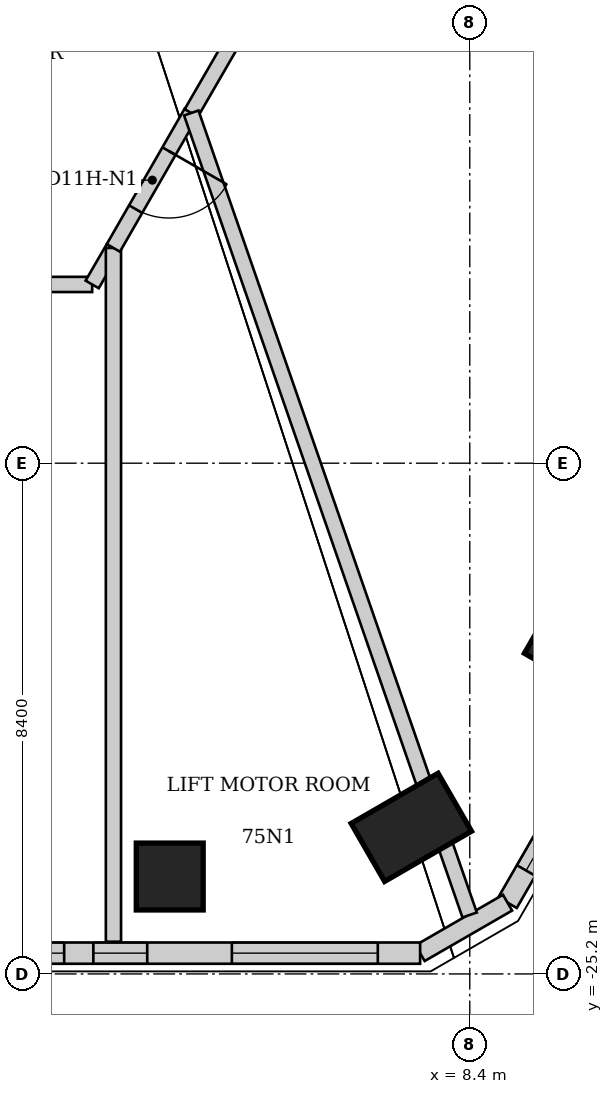
"""IFC4 building model, lengths in metres.
Left out: names, types, materials, properties, quantities, classifications, styles, units other than length and angle.
Written with IfcOpenShell. Run it as: python <this file> out.ifc"""

import sys

from ifc_helpers import new_model, si_unit, direction, frame, frame_2d, origin, origin_2d, place, context, subcontext, project, spatial, polyline, rectangle, outline, extrude, element, fill, save


model = new_model("IFC4")
c1 = context("Model", 3, precision=1e-05, world=origin(), true_north=direction((0.0, 1.0)))
c2 = subcontext(c1, "Body", "Model", "MODEL_VIEW")
j1 = project(units=[si_unit("LENGTHUNIT", "METRE"), si_unit("PLANEANGLEUNIT", "RADIAN")], contexts=[c1])
p1 = place(None, origin())
s1 = spatial("IfcSite", under=j1, at=p1, CompositionType="ELEMENT")
p2 = place(p1, origin())
s2 = spatial("IfcBuilding", under=s1, at=p2, CompositionType="ELEMENT")
p3 = place(p2, frame((0.0, 0.0, 298.8)))
s3 = spatial("IfcBuildingStorey", under=s2, at=p3, CompositionType="ELEMENT", Elevation=298.8)
p4 = place(p3, frame((10.05, -19.725, 0.0), z_axis=(0.0, 0.0, 1.0), x_axis=(0.866025403784, -0.5, 0.0)))
e1 = element("IfcColumn", 1, at=p4, inside=s3, PredefinedType="COLUMN", context=c2, shape_type="SweptSolid", body=[
    extrude(rectangle(XDim=1.1, YDim=1.1, at=origin_2d()), origin(), (0.0, 0.0, 1.0), 7.156),
])
p5 = place(p3, frame((7.439, -22.79, 0.0), z_axis=(0.0, 0.0, 1.0), x_axis=(0.5, -0.866025403784, 0.0)))
e2 = element("IfcColumn", 2, at=p5, inside=s3, PredefinedType="COLUMN", context=c2, shape_type="SweptSolid", body=[
    extrude(rectangle(XDim=1.1, YDim=1.65, at=origin_2d()), origin(), (0.0, 0.0, 1.0), 6.335),
])
p6 = place(p3, frame((3.466, -23.598, 0.0), z_axis=(0.0, 0.0, 1.0), x_axis=(0.0, -1.0, 0.0)))
e3 = element("IfcColumn", 3, at=p6, inside=s3, PredefinedType="COLUMN", context=c2, shape_type="SweptSolid", body=[
    extrude(rectangle(XDim=1.1, YDim=1.1, at=origin_2d()), origin(), (0.0, 0.0, 1.0), 6.118),
])
p7 = place(p3, frame((25.319, 4.202, 0.0), z_axis=(0.0, 0.0, 1.0), x_axis=(-0.499997560549, -0.866026812198, 0.0)))
e4 = element("IfcWall", 4, at=p7, inside=s3, PredefinedType="SOLIDWALL", context=c2, shape_type="SweptSolid", body=[
    extrude(outline(polyline([(0.0, 0.0), (32.597, 0.0), (32.597, 6.021), (0.0, 13.584), (0.0, 0.0)])), frame((0.0, 0.175, 0.0), z_axis=(0.0, -1.0, 0.0), x_axis=(1.0, 0.0, 0.0)), (0.0, 0.0, 1.0), 0.35),
])
p8 = place(p7, frame((0.611, 0.0, 0.6)))
e5 = element("IfcOpeningElement", 5, at=p8, cuts=e4, PredefinedType="OPENING", context=c2, shape_type="SweptSolid", body=[
    extrude(rectangle(XDim=2.4, YDim=3.6, at=frame_2d((1.2, 1.8))), frame((0.0, 0.185, 0.0), z_axis=(0.0, -1.0, 0.0), x_axis=(1.0, 0.0, 0.0)), (0.0, 0.0, 1.0), 0.37),
])
p9 = place(p7, frame((4.233, 0.0, 0.6)))
e6 = element("IfcOpeningElement", 6, at=p9, cuts=e4, PredefinedType="OPENING", context=c2, shape_type="SweptSolid", body=[
    extrude(rectangle(XDim=2.4, YDim=3.6, at=frame_2d((1.2, 1.8))), frame((0.0, 0.185, 0.0), z_axis=(0.0, -1.0, 0.0), x_axis=(1.0, 0.0, 0.0)), (0.0, 0.0, 1.0), 0.37),
])
p10 = place(p7, frame((7.855, 0.0, 3.005)))
e7 = element("IfcOpeningElement", 7, at=p10, cuts=e4, PredefinedType="OPENING", context=c2, shape_type="SweptSolid", body=[
    extrude(rectangle(XDim=0.456, YDim=1.195, at=frame_2d((0.228, 0.598))), frame((0.0, 0.185, 0.0), z_axis=(0.0, -1.0, 0.0), x_axis=(1.0, 0.0, 0.0)), (0.0, 0.0, 1.0), 0.37),
])
p11 = place(p7, frame((9.23, 0.0, 0.601)))
e8 = element("IfcOpeningElement", 8, at=p11, cuts=e4, PredefinedType="OPENING", context=c2, shape_type="SweptSolid", body=[
    extrude(rectangle(XDim=1.024, YDim=3.249, at=frame_2d((0.512, 1.625))), frame((0.0, 0.185, 0.0), z_axis=(0.0, -1.0, 0.0), x_axis=(1.0, 0.0, 0.0)), (0.0, 0.0, 1.0), 0.37),
])
p12 = place(p7, frame((11.477, 0.0, 0.601)))
e9 = element("IfcOpeningElement", 9, at=p12, cuts=e4, PredefinedType="OPENING", context=c2, shape_type="SweptSolid", body=[
    extrude(rectangle(XDim=1.444, YDim=3.599, at=frame_2d((0.722, 1.8))), frame((0.0, 0.185, 0.0), z_axis=(0.0, -1.0, 0.0), x_axis=(1.0, 0.0, 0.0)), (0.0, 0.0, 1.0), 0.37),
])
p13 = place(p7, frame((15.098, 0.0, 0.6)))
e10 = element("IfcOpeningElement", 10, at=p13, cuts=e4, PredefinedType="OPENING", context=c2, shape_type="SweptSolid", body=[
    extrude(rectangle(XDim=2.4, YDim=3.6, at=frame_2d((1.2, 1.8))), frame((0.0, 0.185, 0.0), z_axis=(0.0, -1.0, 0.0), x_axis=(1.0, 0.0, 0.0)), (0.0, 0.0, 1.0), 0.37),
])
p14 = place(p7, frame((19.858, 0.0, 0.601)))
e11 = element("IfcOpeningElement", 11, at=p14, cuts=e4, PredefinedType="OPENING", context=c2, shape_type="SweptSolid", body=[
    extrude(rectangle(XDim=1.262, YDim=3.099, at=frame_2d((0.631, 1.55))), frame((0.0, 0.185, 0.0), z_axis=(0.0, -1.0, 0.0), x_axis=(1.0, 0.0, 0.0)), (0.0, 0.0, 1.0), 0.37),
])
p15 = place(p7, frame((22.343, 0.0, 0.601)))
e12 = element("IfcOpeningElement", 12, at=p15, cuts=e4, PredefinedType="OPENING", context=c2, shape_type="SweptSolid", body=[
    extrude(rectangle(XDim=0.994, YDim=2.449, at=frame_2d((0.497, 1.225))), frame((0.0, 0.185, 0.0), z_axis=(0.0, -1.0, 0.0), x_axis=(1.0, 0.0, 0.0)), (0.0, 0.0, 1.0), 0.37),
])
p16 = place(p7, frame((24.142, 0.0, 2.72)))
e13 = element("IfcOpeningElement", 13, at=p16, cuts=e4, PredefinedType="OPENING", context=c2, shape_type="SweptSolid", body=[
    extrude(rectangle(XDim=0.6, YDim=1.48, at=frame_2d((0.3, 0.74))), frame((0.0, 0.185, 0.0), z_axis=(0.0, -1.0, 0.0), x_axis=(1.0, 0.0, 0.0)), (0.0, 0.0, 1.0), 0.37),
])
p17 = place(p7, frame((25.964, 0.0, 0.6)))
e14 = element("IfcOpeningElement", 14, at=p17, cuts=e4, PredefinedType="OPENING", context=c2, shape_type="SweptSolid", body=[
    extrude(rectangle(XDim=2.4, YDim=3.6, at=frame_2d((1.2, 1.8))), frame((0.0, 0.185, 0.0), z_axis=(0.0, -1.0, 0.0), x_axis=(1.0, 0.0, 0.0)), (0.0, 0.0, 1.0), 0.37),
])
p18 = place(p7, frame((29.586, 0.0, 0.6)))
e15 = element("IfcOpeningElement", 15, at=p18, cuts=e4, PredefinedType="OPENING", context=c2, shape_type="SweptSolid", body=[
    extrude(rectangle(XDim=2.4, YDim=3.6, at=frame_2d((1.2, 1.8))), frame((0.0, 0.185, 0.0), z_axis=(0.0, -1.0, 0.0), x_axis=(1.0, 0.0, 0.0)), (0.0, 0.0, 1.0), 0.37),
])
p19 = place(p7, frame((2.698, 0.0, 5.6)))
e16 = element("IfcOpeningElement", 16, at=p19, cuts=e4, PredefinedType="OPENING", context=c2, shape_type="SweptSolid", body=[
    extrude(rectangle(XDim=2.0, YDim=2.4, at=frame_2d((1.0, 1.2))), frame((0.0, 0.185, 0.0), z_axis=(0.0, -1.0, 0.0), x_axis=(1.0, 0.0, 0.0)), (0.0, 0.0, 1.0), 0.37),
])
p20 = place(p7, frame((6.298, 0.0, 5.6)))
e17 = element("IfcOpeningElement", 17, at=p20, cuts=e4, PredefinedType="OPENING", context=c2, shape_type="SweptSolid", body=[
    extrude(rectangle(XDim=2.0, YDim=2.4, at=frame_2d((1.0, 1.2))), frame((0.0, 0.185, 0.0), z_axis=(0.0, -1.0, 0.0), x_axis=(1.0, 0.0, 0.0)), (0.0, 0.0, 1.0), 0.37),
])
p21 = place(p7, frame((10.457, 0.0, 5.601)))
e18 = element("IfcOpeningElement", 18, at=p21, cuts=e4, PredefinedType="OPENING", context=c2, shape_type="SweptSolid", body=[
    extrude(rectangle(XDim=1.348, YDim=2.124, at=frame_2d((0.674, 1.062))), frame((0.0, 0.185, 0.0), z_axis=(0.0, -1.0, 0.0), x_axis=(1.0, 0.0, 0.0)), (0.0, 0.0, 1.0), 0.37),
])
p22 = place(p7, frame((13.498, 0.0, 5.6)))
e19 = element("IfcOpeningElement", 19, at=p22, cuts=e4, PredefinedType="OPENING", context=c2, shape_type="SweptSolid", body=[
    extrude(rectangle(XDim=2.0, YDim=2.4, at=frame_2d((1.0, 1.2))), frame((0.0, 0.185, 0.0), z_axis=(0.0, -1.0, 0.0), x_axis=(1.0, 0.0, 0.0)), (0.0, 0.0, 1.0), 0.37),
])
p23 = place(p7, frame((17.098, 0.0, 5.6)))
e20 = element("IfcOpeningElement", 20, at=p23, cuts=e4, PredefinedType="OPENING", context=c2, shape_type="SweptSolid", body=[
    extrude(rectangle(XDim=2.0, YDim=2.4, at=frame_2d((1.0, 1.2))), frame((0.0, 0.185, 0.0), z_axis=(0.0, -1.0, 0.0), x_axis=(1.0, 0.0, 0.0)), (0.0, 0.0, 1.0), 0.37),
])
p24 = place(p3, frame((9.021, -24.028, 0.0), z_axis=(0.0, 0.0, 1.0), x_axis=(-0.865989634427, -0.500061949227, 0.0)))
e21 = element("IfcWall", 21, at=p24, inside=s3, PredefinedType="SOLIDWALL", context=c2, shape_type="SweptSolid", body=[
    extrude(outline(polyline([(0.0, 0.0), (1.66, 0.0), (1.66, 5.787), (0.0, 6.009), (0.0, 0.0)])), frame((0.0, 0.15, 0.0), z_axis=(0.0, -1.0, 0.0), x_axis=(1.0, 0.0, 0.0)), (0.0, 0.0, 1.0), 0.3),
])
p25 = place(p3, frame((7.583, -24.858, 0.0), z_axis=(0.0, 0.0, 1.0), x_axis=(-1.0, 0.0, 0.0)))
e22 = element("IfcWall", 22, at=p25, inside=s3, PredefinedType="SOLIDWALL", context=c2, shape_type="SweptSolid", body=[
    extrude(outline(polyline([(0.0, 0.0), (15.167, 0.0), (15.167, 5.775), (0.0, 5.775), (0.0, 0.0)])), frame((0.0, 0.175, 0.0), z_axis=(0.0, -1.0, 0.0), x_axis=(1.0, 0.0, 0.0)), (0.0, 0.0, 1.0), 0.35),
])
p26 = place(p25, frame((0.696, 0.0, 0.6)))
e23 = element("IfcOpeningElement", 23, at=p26, cuts=e22, PredefinedType="OPENING", context=c2, shape_type="SweptSolid", body=[
    extrude(rectangle(XDim=2.4, YDim=3.6, at=frame_2d((1.2, 1.8))), frame((0.0, 0.185, 0.0), z_axis=(0.0, -1.0, 0.0), x_axis=(1.0, 0.0, 0.0)), (0.0, 0.0, 1.0), 0.37),
])
p27 = place(p25, frame((4.488, 0.0, 2.729)))
e24 = element("IfcOpeningElement", 24, at=p27, cuts=e22, PredefinedType="OPENING", context=c2, shape_type="SweptSolid", body=[
    extrude(rectangle(XDim=0.886, YDim=1.471, at=frame_2d((0.443, 0.735))), frame((0.0, 0.185, 0.0), z_axis=(0.0, -1.0, 0.0), x_axis=(1.0, 0.0, 0.0)), (0.0, 0.0, 1.0), 0.37),
])
p28 = place(p25, frame((5.854, 0.0, 0.601)))
e25 = element("IfcOpeningElement", 25, at=p28, cuts=e22, PredefinedType="OPENING", context=c2, shape_type="SweptSolid", body=[
    extrude(rectangle(XDim=1.033, YDim=1.719, at=frame_2d((0.517, 0.859))), frame((0.0, 0.185, 0.0), z_axis=(0.0, -1.0, 0.0), x_axis=(1.0, 0.0, 0.0)), (0.0, 0.0, 1.0), 0.37),
])
p29 = place(p25, frame((8.28, 0.0, 0.601)))
e26 = element("IfcOpeningElement", 26, at=p29, cuts=e22, PredefinedType="OPENING", context=c2, shape_type="SweptSolid", body=[
    extrude(rectangle(XDim=1.033, YDim=1.719, at=frame_2d((0.517, 0.859))), frame((0.0, 0.185, 0.0), z_axis=(0.0, -1.0, 0.0), x_axis=(1.0, 0.0, 0.0)), (0.0, 0.0, 1.0), 0.37),
])
p30 = place(p25, frame((9.808, 0.0, 2.704)))
e27 = element("IfcOpeningElement", 27, at=p30, cuts=e22, PredefinedType="OPENING", context=c2, shape_type="SweptSolid", body=[
    extrude(rectangle(XDim=0.871, YDim=1.496, at=frame_2d((0.436, 0.748))), frame((0.0, 0.185, 0.0), z_axis=(0.0, -1.0, 0.0), x_axis=(1.0, 0.0, 0.0)), (0.0, 0.0, 1.0), 0.37),
])
p31 = place(p25, frame((12.071, 0.0, 0.6)))
e28 = element("IfcOpeningElement", 28, at=p31, cuts=e22, PredefinedType="OPENING", context=c2, shape_type="SweptSolid", body=[
    extrude(rectangle(XDim=2.4, YDim=3.6, at=frame_2d((1.2, 1.8))), frame((0.0, 0.185, 0.0), z_axis=(0.0, -1.0, 0.0), x_axis=(1.0, 0.0, 0.0)), (0.0, 0.0, 1.0), 0.37),
])
p32 = place(p3, frame((-2.19, -13.86, 0.0), z_axis=(0.0, 0.0, 1.0), x_axis=(1.0, 0.0, 0.0)))
e29 = element("IfcWall", 29, at=p32, inside=s3, PredefinedType="PARTITIONING", context=c2, shape_type="SweptSolid", body=[
    extrude(rectangle(XDim=4.38, YDim=0.25, at=frame_2d((2.19, 0.0))), origin(), (0.0, 0.0, 1.0), 5.0),
])
p33 = place(p32, frame((1.64, 0.0, 0.0)))
e30 = element("IfcOpeningElement", 30, at=p33, cuts=e29, PredefinedType="OPENING", context=c2, shape_type="SweptSolid", body=[
    extrude(rectangle(XDim=1.1, YDim=2.2, at=frame_2d((0.55, 1.1))), frame((0.0, 0.125, 0.0), z_axis=(0.0, -1.0, 0.0), x_axis=(1.0, 0.0, 0.0)), (0.0, 0.0, 1.0), 0.25),
])
p34 = place(p3, frame((2.19, -13.86, 0.0), z_axis=(0.0, 0.0, 1.0), x_axis=(0.501465632015, 0.865177565537, 0.0)))
e31 = element("IfcWall", 31, at=p34, inside=s3, PredefinedType="PARTITIONING", context=c2, shape_type="SweptSolid", body=[
    extrude(rectangle(XDim=0.695, YDim=0.25, at=frame_2d((0.347, 0.0))), origin(), (0.0, 0.0, 1.0), 5.0),
])
p35 = place(p3, frame((2.54, -13.26, 0.0), z_axis=(0.0, 0.0, 1.0), x_axis=(0.0, -1.0, 0.0)))
e32 = element("IfcWall", 32, at=p35, inside=s3, PredefinedType="PARTITIONING", context=c2, shape_type="SweptSolid", body=[
    extrude(rectangle(XDim=11.41, YDim=0.25, at=frame_2d((5.705, 0.0))), origin(), (0.0, 0.0, 1.0), 5.0),
])
p36 = place(p3, frame((3.82, -11.03, 0.0), z_axis=(0.0, 0.0, 1.0), x_axis=(-0.498488963566, -0.866896045211, 0.0)))
e33 = element("IfcWall", 33, at=p36, inside=s3, PredefinedType="PARTITIONING", context=c2, shape_type="SweptSolid", body=[
    extrude(rectangle(XDim=2.571, YDim=0.25, at=frame_2d((1.286, 0.0))), origin(), (0.0, 0.0, 1.0), 5.0),
])
p37 = place(p36, frame((0.736, 0.0, 0.0)))
e34 = element("IfcOpeningElement", 34, at=p37, cuts=e33, PredefinedType="OPENING", context=c2, shape_type="SweptSolid", body=[
    extrude(rectangle(XDim=1.1, YDim=2.2, at=frame_2d((0.55, 1.1))), frame((0.0, 0.125, 0.0), z_axis=(0.0, -1.0, 0.0), x_axis=(1.0, 0.0, 0.0)), (0.0, 0.0, 1.0), 0.25),
])
p38 = place(p3, frame((4.93, -9.12, 0.0), z_axis=(0.0, 0.0, 1.0), x_axis=(-0.500472006703, -0.86575271903, 0.0)))
e35 = element("IfcWall", 35, at=p38, inside=s3, PredefinedType="PARTITIONING", context=c2, shape_type="SweptSolid", body=[
    extrude(rectangle(XDim=2.218, YDim=0.25, at=frame_2d((1.109, 0.0))), origin(), (0.0, 0.0, 1.0), 5.0),
])
p39 = place(p3, frame((8.398, -24.23, 0.0), z_axis=(0.0, 0.0, 1.0), x_axis=(-0.327859974014, 0.944726329388, 0.0)))
e36 = element("IfcWall", 36, at=p39, inside=s3, PredefinedType="PARTITIONING", context=c2, shape_type="SweptSolid", body=[
    extrude(rectangle(XDim=13.962, YDim=0.25, at=frame_2d((6.981, 0.0))), origin(), (0.0, 0.0, 1.0), 5.0),
])
p40 = place(p18, origin())
e37 = element("IfcWindow", 37, at=p40, inside=s3, PartitioningType="SINGLE_PANEL", PredefinedType="WINDOW", context=c2, shape_type="SweptSolid", body=[
    extrude(rectangle(XDim=2.4, YDim=3.6, at=frame_2d((1.2, 1.8))), frame((0.0, 0.03, 0.0), z_axis=(0.0, -1.0, 0.0), x_axis=(1.0, 0.0, 0.0)), (0.0, 0.0, 1.0), 0.06),
])
fill(e15, e37)
p41 = place(p26, origin())
e38 = element("IfcWindow", 38, at=p41, inside=s3, PartitioningType="SINGLE_PANEL", PredefinedType="WINDOW", context=c2, shape_type="SweptSolid", body=[
    extrude(rectangle(XDim=2.4, YDim=3.6, at=frame_2d((1.2, 1.8))), frame((0.0, 0.03, 0.0), z_axis=(0.0, -1.0, 0.0), x_axis=(1.0, 0.0, 0.0)), (0.0, 0.0, 1.0), 0.06),
])
fill(e23, e38)
p42 = place(p27, origin())
e39 = element("IfcWindow", 39, at=p42, inside=s3, PartitioningType="SINGLE_PANEL", PredefinedType="WINDOW", context=c2, shape_type="SweptSolid", body=[
    extrude(rectangle(XDim=0.886, YDim=1.471, at=frame_2d((0.443, 0.735))), frame((0.0, 0.03, 0.0), z_axis=(0.0, -1.0, 0.0), x_axis=(1.0, 0.0, 0.0)), (0.0, 0.0, 1.0), 0.06),
])
fill(e24, e39)
p43 = place(p28, origin())
e40 = element("IfcWindow", 40, at=p43, inside=s3, PartitioningType="SINGLE_PANEL", PredefinedType="WINDOW", context=c2, shape_type="SweptSolid", body=[
    extrude(rectangle(XDim=1.033, YDim=1.719, at=frame_2d((0.517, 0.859))), frame((0.0, 0.03, 0.0), z_axis=(0.0, -1.0, 0.0), x_axis=(1.0, 0.0, 0.0)), (0.0, 0.0, 1.0), 0.06),
])
fill(e25, e40)
p44 = place(p37, origin())
e41 = element("IfcDoor", 41, at=p44, inside=s3, OperationType="SINGLE_SWING_LEFT", PredefinedType="DOOR", context=c2, shape_type="SweptSolid", body=[
    extrude(rectangle(XDim=1.1, YDim=2.2, at=frame_2d((0.55, 1.1))), frame((0.0, 0.025, 0.0), z_axis=(0.0, -1.0, 0.0), x_axis=(1.0, 0.0, 0.0)), (0.0, 0.0, 1.0), 0.05),
])
fill(e34, e41)
save(model, sys.argv[1])
